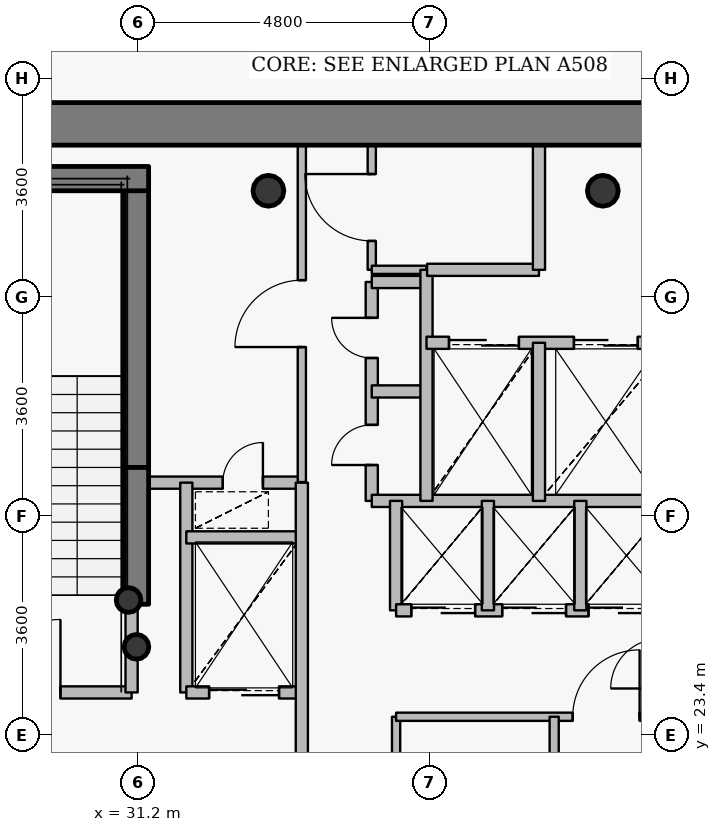
"""IFC4 building model, lengths in metres.
Left out: names, types, materials, properties, quantities, classifications, styles, units other than length and angle.
Written with IfcOpenShell. Run it as: python <this file> out.ifc"""

import sys

from ifc_helpers import new_model, si_unit, direction, frame, frame_2d, origin, origin_2d, place, context, subcontext, project, spatial, rectangle, hollow_circle, extrude, source, transform, mapped, element, fill, save


model = new_model("IFC4")
c1 = context("Model", 3, precision=1e-05, world=origin(), true_north=direction((0.0, 1.0)))
c2 = subcontext(c1, "Body", "Model", "MODEL_VIEW")
j1 = project(units=[si_unit("LENGTHUNIT", "METRE"), si_unit("PLANEANGLEUNIT", "RADIAN")], contexts=[c1])
p1 = place(None, origin())
s1 = spatial("IfcSite", under=j1, at=p1, CompositionType="ELEMENT")
p2 = place(p1, origin())
s2 = spatial("IfcBuilding", under=s1, at=p2, CompositionType="ELEMENT")
p3 = place(p2, frame((0.0, 0.0, 310.5)))
s3 = spatial("IfcBuildingStorey", under=s2, at=p3, CompositionType="ELEMENT", Elevation=310.5)
for number, where, z_axis, x_axis in (
    (1, (38.85, 32.35, 0.0), (0.0, 0.0, 1.0), (1.0, 0.0, 0.0)),
    (2, (33.35, 32.35, 0.0), (0.0, 0.0, 1.0), (1.0, 0.0, 0.0)),
):
    element("IfcColumn", number, at=place(p3, frame(where, z_axis=z_axis, x_axis=x_axis)), inside=s3, PredefinedType="COLUMN", context=c2, shape_type="SweptSolid", body=[
        extrude(hollow_circle(Radius=0.254, WallThickness=0.02, at=origin_2d()), origin(), (0.0, 0.0, 1.0), 3.75),
    ])
p4 = place(p3, frame((31.18, 27.8, 0.0), z_axis=(0.0, 0.0, 1.0), x_axis=(0.0, 1.0, 0.0)))
e3 = element("IfcWall", 3, at=p4, inside=s3, PredefinedType="SHEAR", context=c2, shape_type="SweptSolid", body=[
    extrude(rectangle(XDim=4.75, YDim=0.4, at=frame_2d((2.375, 0.0))), origin(), (0.0, 0.0, 1.0), 3.75),
])
p5 = place(p3, frame((27.25, 32.55, 0.0), z_axis=(0.0, 0.0, 1.0), x_axis=(1.0, 0.0, 0.0)))
e4 = element("IfcWall", 4, at=p5, inside=s3, PredefinedType="SHEAR", context=c2, shape_type="SweptSolid", body=[
    extrude(rectangle(XDim=4.13, YDim=0.4, at=frame_2d((2.065, 0.0))), origin(), (0.0, 0.0, 1.0), 3.75),
])
for number, where, z_axis, x_axis in (
    (5, (31.05, 25.62, 0.0), (0.0, 0.0, 1.0), (1.0, 0.0, 0.0)),
    (6, (31.18, 24.85, 0.0), (0.0, 0.0, 1.0), (1.0, 0.0, 0.0)),
):
    element("IfcColumn", number, at=place(p3, frame(where, z_axis=z_axis, x_axis=x_axis)), inside=s3, PredefinedType="COLUMN", context=c2, shape_type="SweptSolid", body=[
        extrude(hollow_circle(Radius=0.203, WallThickness=0.016, at=origin_2d()), origin(), (0.0, 0.0, 1.0), 3.75),
    ])
p6 = place(p3, frame((27.65, 33.45, 0.0), z_axis=(0.0, 0.0, 1.0), x_axis=(1.0, 0.0, 0.0)))
e7 = element("IfcWall", 7, at=p6, inside=s3, PredefinedType="SHEAR", context=c2, shape_type="SweptSolid", body=[
    extrude(rectangle(XDim=16.7, YDim=0.7, at=frame_2d((8.35, 0.0))), origin(), (0.0, 0.0, 1.0), 3.05),
])
p7 = place(p6, frame((12.775, 0.0, 0.0)))
e8 = element("IfcOpeningElement", 8, at=p7, cuts=e7, PredefinedType="OPENING", context=c2, shape_type="SweptSolid", body=[
    extrude(rectangle(XDim=1.15, YDim=2.15, at=origin_2d()), frame((0.575, 0.36, 1.075), z_axis=(0.0, -1.0, 0.0), x_axis=(1.0, 0.0, 0.0)), (0.0, 0.0, 1.0), 0.72),
])
p8 = place(p3, frame((31.18, 25.55, 0.0), z_axis=(0.0, 0.0, 1.0), x_axis=(0.0, 1.0, 0.0)))
e9 = element("IfcWall", 9, at=p8, inside=s3, PredefinedType="SHEAR", context=c2, shape_type="SweptSolid", body=[
    extrude(rectangle(XDim=2.25, YDim=0.4, at=frame_2d((1.125, 0.0))), origin(), (0.0, 0.0, 1.0), 3.1),
])
p9 = place(p3, frame((27.56, 24.1, 0.0), z_axis=(0.0, 0.0, 1.0), x_axis=(1.0, 0.0, 0.0)))
e10 = element("IfcWall", 10, at=p9, inside=s3, PredefinedType="PARTITIONING", context=c2, shape_type="SweptSolid", body=[
    extrude(rectangle(XDim=3.54, YDim=0.2, at=frame_2d((1.77, 0.0))), origin(), (0.0, 0.0, 1.0), 3.5),
])
p10 = place(p9, frame((1.17, 0.0, 0.0)))
e11 = element("IfcOpeningElement", 11, at=p10, cuts=e10, PredefinedType="OPENING", context=c2, shape_type="SweptSolid", body=[
    extrude(rectangle(XDim=1.2, YDim=2.15, at=origin_2d()), frame((0.6, 0.11, 1.075), z_axis=(0.0, -1.0, 0.0), x_axis=(1.0, 0.0, 0.0)), (0.0, 0.0, 1.0), 0.22),
])
p11 = place(p3, frame((31.1, 24.1, 0.0), z_axis=(0.0, 0.0, 1.0), x_axis=(0.0, 1.0, 0.0)))
e12 = element("IfcWall", 12, at=p11, inside=s3, PredefinedType="PARTITIONING", context=c2, shape_type="SweptSolid", body=[
    extrude(rectangle(XDim=1.44, YDim=0.2, at=frame_2d((0.72, 0.0))), origin(), (0.0, 0.0, 1.0), 3.5),
])
p12 = place(p3, frame((31.1, 27.55, 0.0), z_axis=(0.0, 0.0, 1.0), x_axis=(1.0, 0.0, 0.0)))
e13 = element("IfcWall", 13, at=p12, inside=s3, PredefinedType="PARTITIONING", context=c2, shape_type="SweptSolid", body=[
    extrude(rectangle(XDim=2.8, YDim=0.2, at=frame_2d((1.4, 0.0))), origin(), (0.0, 0.0, 1.0), 3.085),
])
p13 = place(p12, frame((1.5, 0.0, 0.0)))
e14 = element("IfcOpeningElement", 14, at=p13, cuts=e13, PredefinedType="OPENING", context=c2, shape_type="SweptSolid", body=[
    extrude(rectangle(XDim=0.66, YDim=2.05, at=origin_2d()), frame((0.33, 0.11, 1.025), z_axis=(0.0, -1.0, 0.0), x_axis=(1.0, 0.0, 0.0)), (0.0, 0.0, 1.0), 0.22),
])
p14 = place(p3, frame((32.0, 24.1, 0.0), z_axis=(0.0, 0.0, 1.0), x_axis=(0.0, 1.0, 0.0)))
e15 = element("IfcWall", 15, at=p14, inside=s3, PredefinedType="PARTITIONING", context=c2, shape_type="SweptSolid", body=[
    extrude(rectangle(XDim=3.45, YDim=0.2, at=frame_2d((1.725, 0.0))), origin(), (0.0, 0.0, 1.0), 3.5),
])
p15 = place(p3, frame((32.0, 24.1, 0.0), z_axis=(0.0, 0.0, 1.0), x_axis=(1.0, 0.0, 0.0)))
e16 = element("IfcWall", 16, at=p15, inside=s3, PredefinedType="PARTITIONING", context=c2, shape_type="SweptSolid", body=[
    extrude(rectangle(XDim=1.9, YDim=0.2, at=frame_2d((0.95, 0.0))), origin(), (0.0, 0.0, 1.0), 3.085),
])
p16 = place(p15, frame((0.375, 0.0, 0.0)))
e17 = element("IfcOpeningElement", 17, at=p16, cuts=e16, PredefinedType="OPENING", context=c2, shape_type="SweptSolid", body=[
    extrude(rectangle(XDim=1.15, YDim=2.15, at=origin_2d()), frame((0.575, 0.11, 1.075), z_axis=(0.0, -1.0, 0.0), x_axis=(1.0, 0.0, 0.0)), (0.0, 0.0, 1.0), 0.22),
])
p17 = place(p3, frame((32.0, 26.65, 0.0), z_axis=(0.0, 0.0, 1.0), x_axis=(1.0, 0.0, 0.0)))
e18 = element("IfcWall", 18, at=p17, inside=s3, PredefinedType="PARTITIONING", context=c2, shape_type="SweptSolid", body=[
    extrude(rectangle(XDim=1.9, YDim=0.2, at=frame_2d((0.95, 0.0))), origin(), (0.0, 0.0, 1.0), 3.085),
])
p18 = place(p3, frame((33.9, 20.9, 0.0), z_axis=(0.0, 0.0, 1.0), x_axis=(0.0, 1.0, 0.0)))
e19 = element("IfcWall", 19, at=p18, inside=s3, PredefinedType="PARTITIONING", context=c2, shape_type="SweptSolid", body=[
    extrude(rectangle(XDim=6.65, YDim=0.2, at=frame_2d((3.325, 0.0))), origin(), (0.0, 0.0, 1.0), 3.085),
])
p19 = place(p3, frame((33.9, 27.56, 0.0), z_axis=(0.0, 0.0, 1.0), x_axis=(0.0, 1.0, 0.0)))
e20 = element("IfcWall", 20, at=p19, inside=s3, PredefinedType="PARTITIONING", context=c2, shape_type="SweptSolid", body=[
    extrude(rectangle(XDim=5.54, YDim=0.135, at=frame_2d((2.77, 0.0))), origin(), (0.0, 0.0, 1.0), 3.085),
])
p20 = place(p19, frame((2.22, 0.0, 0.0)))
e21 = element("IfcOpeningElement", 21, at=p20, cuts=e20, PredefinedType="OPENING", context=c2, shape_type="SweptSolid", body=[
    extrude(rectangle(XDim=1.1, YDim=2.15, at=origin_2d()), frame((0.55, 0.078, 1.075), z_axis=(0.0, -1.0, 0.0), x_axis=(1.0, 0.0, 0.0)), (0.0, 0.0, 1.0), 0.155),
])
p21 = place(p3, frame((35.05, 27.25, 0.0), z_axis=(0.0, 0.0, 1.0), x_axis=(0.0, 1.0, 0.0)))
e22 = element("IfcWall", 22, at=p21, inside=s3, PredefinedType="PARTITIONING", context=c2, shape_type="SweptSolid", body=[
    extrude(rectangle(XDim=3.6, YDim=0.2, at=frame_2d((1.8, 0.0))), origin(), (0.0, 0.0, 1.0), 3.5),
])
p22 = place(p21, frame((0.59, 0.0, 0.0)))
e23 = element("IfcOpeningElement", 23, at=p22, cuts=e22, PredefinedType="OPENING", context=c2, shape_type="SweptSolid", body=[
    extrude(rectangle(XDim=0.66, YDim=2.05, at=origin_2d()), frame((0.33, 0.11, 1.025), z_axis=(0.0, -1.0, 0.0), x_axis=(1.0, 0.0, 0.0)), (0.0, 0.0, 1.0), 0.22),
])
p23 = place(p21, frame((2.35, 0.0, 0.0)))
e24 = element("IfcOpeningElement", 24, at=p23, cuts=e22, PredefinedType="OPENING", context=c2, shape_type="SweptSolid", body=[
    extrude(rectangle(XDim=0.66, YDim=2.05, at=origin_2d()), frame((0.33, 0.11, 1.025), z_axis=(0.0, -1.0, 0.0), x_axis=(1.0, 0.0, 0.0)), (0.0, 0.0, 1.0), 0.22),
])
p24 = place(p3, frame((35.05, 27.25, 0.0), z_axis=(0.0, 0.0, 1.0), x_axis=(1.0, 0.0, 0.0)))
e25 = element("IfcWall", 25, at=p24, inside=s3, PredefinedType="PARTITIONING", context=c2, shape_type="SweptSolid", body=[
    extrude(rectangle(XDim=4.95, YDim=0.2, at=frame_2d((2.475, 0.0))), origin(), (0.0, 0.0, 1.0), 3.085),
])
for number, where, z_axis, x_axis in (
    (26, (35.05, 29.05, 0.0), (0.0, 0.0, 1.0), (1.0, 0.0, 0.0)),
    (27, (35.05, 30.85, 0.0), (0.0, 0.0, 1.0), (1.0, 0.0, 0.0)),
):
    element("IfcWall", number, at=place(p3, frame(where, z_axis=z_axis, x_axis=x_axis)), inside=s3, PredefinedType="PARTITIONING", context=c2, shape_type="SweptSolid", body=[
        extrude(rectangle(XDim=0.9, YDim=0.2, at=frame_2d((0.45, 0.0))), origin(), (0.0, 0.0, 1.0), 3.5),
    ])
p25 = place(p3, frame((35.05, 31.05, 0.0), z_axis=(0.0, 0.0, 1.0), x_axis=(0.0, 1.0, 0.0)))
e28 = element("IfcWall", 28, at=p25, inside=s3, PredefinedType="PARTITIONING", context=c2, shape_type="SweptSolid", body=[
    extrude(rectangle(XDim=2.05, YDim=0.135, at=frame_2d((1.025, 0.0))), origin(), (0.0, 0.0, 1.0), 3.085),
])
p26 = place(p25, frame((0.475, 0.0, 0.0)))
e29 = element("IfcOpeningElement", 29, at=p26, cuts=e28, PredefinedType="OPENING", context=c2, shape_type="SweptSolid", body=[
    extrude(rectangle(XDim=1.1, YDim=2.15, at=origin_2d()), frame((0.55, 0.078, 1.075), z_axis=(0.0, -1.0, 0.0), x_axis=(1.0, 0.0, 0.0)), (0.0, 0.0, 1.0), 0.155),
])
p27 = place(p3, frame((35.05, 31.05, 0.0), z_axis=(0.0, 0.0, 1.0), x_axis=(1.0, 0.0, 0.0)))
e30 = element("IfcWall", 30, at=p27, inside=s3, PredefinedType="PARTITIONING", context=c2, shape_type="SweptSolid", body=[
    extrude(rectangle(XDim=0.9, YDim=0.135, at=frame_2d((0.45, 0.0))), origin(), (0.0, 0.0, 1.0), 3.5),
])
p28 = place(p3, frame((35.45, 20.9, 0.0), z_axis=(0.0, 0.0, 1.0), x_axis=(0.0, 1.0, 0.0)))
e31 = element("IfcWall", 31, at=p28, inside=s3, PredefinedType="PARTITIONING", context=c2, shape_type="SweptSolid", body=[
    extrude(rectangle(XDim=2.8, YDim=0.135, at=frame_2d((1.4, 0.0))), origin(), (0.0, 0.0, 1.0), 3.085),
])
p29 = place(p28, frame((0.85, 0.0, 0.0)))
e32 = element("IfcOpeningElement", 32, at=p29, cuts=e31, PredefinedType="OPENING", context=c2, shape_type="SweptSolid", body=[
    extrude(rectangle(XDim=1.1, YDim=2.15, at=origin_2d()), frame((0.55, 0.078, 1.075), z_axis=(0.0, -1.0, 0.0), x_axis=(1.0, 0.0, 0.0)), (0.0, 0.0, 1.0), 0.155),
])
p30 = place(p3, frame((35.45, 23.7, 0.0), z_axis=(0.0, 0.0, 1.0), x_axis=(1.0, 0.0, 0.0)))
e33 = element("IfcWall", 33, at=p30, inside=s3, PredefinedType="PARTITIONING", context=c2, shape_type="SweptSolid", body=[
    extrude(rectangle(XDim=4.35, YDim=0.135, at=frame_2d((2.175, 0.0))), origin(), (0.0, 0.0, 1.0), 3.085),
])
p31 = place(p30, frame((2.905, 0.0, 0.0)))
e34 = element("IfcOpeningElement", 34, at=p31, cuts=e33, PredefinedType="OPENING", context=c2, shape_type="SweptSolid", body=[
    extrude(rectangle(XDim=1.1, YDim=2.15, at=origin_2d()), frame((0.55, 0.078, 1.075), z_axis=(0.0, -1.0, 0.0), x_axis=(1.0, 0.0, 0.0)), (0.0, 0.0, 1.0), 0.155),
])
p32 = place(p3, frame((35.45, 25.45, 0.0), z_axis=(0.0, 0.0, 1.0), x_axis=(0.0, 1.0, 0.0)))
e35 = element("IfcWall", 35, at=p32, inside=s3, PredefinedType="PARTITIONING", context=c2, shape_type="SweptSolid", body=[
    extrude(rectangle(XDim=1.8, YDim=0.2, at=frame_2d((0.9, 0.0))), origin(), (0.0, 0.0, 1.0), 3.5),
])
p33 = place(p3, frame((35.45, 25.45, 0.0), z_axis=(0.0, 0.0, 1.0), x_axis=(1.0, 0.0, 0.0)))
e36 = element("IfcWall", 36, at=p33, inside=s3, PredefinedType="PARTITIONING", context=c2, shape_type="SweptSolid", body=[
    extrude(rectangle(XDim=4.55, YDim=0.2, at=frame_2d((2.275, 0.0))), origin(), (0.0, 0.0, 1.0), 3.085),
])
p34 = place(p33, frame((0.25, 0.0, 0.0)))
e37 = element("IfcOpeningElement", 37, at=p34, cuts=e36, PredefinedType="OPENING", context=c2, shape_type="SweptSolid", body=[
    extrude(rectangle(XDim=1.05, YDim=2.15, at=origin_2d()), frame((0.525, 0.11, 1.075), z_axis=(0.0, -1.0, 0.0), x_axis=(1.0, 0.0, 0.0)), (0.0, 0.0, 1.0), 0.22),
])
p35 = place(p33, frame((1.745, 0.0, 0.0)))
e38 = element("IfcOpeningElement", 38, at=p35, cuts=e36, PredefinedType="OPENING", context=c2, shape_type="SweptSolid", body=[
    extrude(rectangle(XDim=1.05, YDim=2.15, at=origin_2d()), frame((0.525, 0.11, 1.075), z_axis=(0.0, -1.0, 0.0), x_axis=(1.0, 0.0, 0.0)), (0.0, 0.0, 1.0), 0.22),
])
p36 = place(p33, frame((3.165, 0.0, 0.0)))
e39 = element("IfcOpeningElement", 39, at=p36, cuts=e36, PredefinedType="OPENING", context=c2, shape_type="SweptSolid", body=[
    extrude(rectangle(XDim=1.05, YDim=2.15, at=origin_2d()), frame((0.525, 0.11, 1.075), z_axis=(0.0, -1.0, 0.0), x_axis=(1.0, 0.0, 0.0)), (0.0, 0.0, 1.0), 0.22),
])
p37 = place(p3, frame((35.95, 27.25, 0.0), z_axis=(0.0, 0.0, 1.0), x_axis=(0.0, 1.0, 0.0)))
e40 = element("IfcWall", 40, at=p37, inside=s3, PredefinedType="PARTITIONING", context=c2, shape_type="SweptSolid", body=[
    extrude(rectangle(XDim=3.8, YDim=0.2, at=frame_2d((1.9, 0.0))), origin(), (0.0, 0.0, 1.0), 3.5),
])
p38 = place(p3, frame((35.95, 29.85, 0.0), z_axis=(0.0, 0.0, 1.0), x_axis=(1.0, 0.0, 0.0)))
e41 = element("IfcWall", 41, at=p38, inside=s3, PredefinedType="PARTITIONING", context=c2, shape_type="SweptSolid", body=[
    extrude(rectangle(XDim=8.49, YDim=0.2, at=frame_2d((4.245, 0.0))), origin(), (0.0, 0.0, 1.0), 3.085),
])
p39 = place(p38, frame((6.1, 0.0, 0.0)))
e42 = element("IfcOpeningElement", 42, at=p39, cuts=e41, PredefinedType="OPENING", context=c2, shape_type="SweptSolid", body=[
    extrude(rectangle(XDim=1.2, YDim=2.15, at=origin_2d()), frame((0.6, 0.11, 1.075), z_axis=(0.0, -1.0, 0.0), x_axis=(1.0, 0.0, 0.0)), (0.0, 0.0, 1.0), 0.22),
])
p40 = place(p38, frame((0.37, 0.0, 0.0)))
e43 = element("IfcOpeningElement", 43, at=p40, cuts=e41, PredefinedType="OPENING", context=c2, shape_type="SweptSolid", body=[
    extrude(rectangle(XDim=1.15, YDim=2.15, at=origin_2d()), frame((0.575, 0.11, 1.075), z_axis=(0.0, -1.0, 0.0), x_axis=(1.0, 0.0, 0.0)), (0.0, 0.0, 1.0), 0.22),
])
p41 = place(p38, frame((2.425, 0.0, 0.0)))
e44 = element("IfcOpeningElement", 44, at=p41, cuts=e41, PredefinedType="OPENING", context=c2, shape_type="SweptSolid", body=[
    extrude(rectangle(XDim=1.05, YDim=2.15, at=origin_2d()), frame((0.525, 0.11, 1.075), z_axis=(0.0, -1.0, 0.0), x_axis=(1.0, 0.0, 0.0)), (0.0, 0.0, 1.0), 0.22),
])
p42 = place(p3, frame((35.96, 31.05, 0.0), z_axis=(0.0, 0.0, 1.0), x_axis=(1.0, 0.0, 0.0)))
e45 = element("IfcWall", 45, at=p42, inside=s3, PredefinedType="PARTITIONING", context=c2, shape_type="SweptSolid", body=[
    extrude(rectangle(XDim=1.84, YDim=0.2, at=frame_2d((0.92, 0.0))), origin(), (0.0, 0.0, 1.0), 3.5),
])
p43 = place(p3, frame((36.96, 25.45, 0.0), z_axis=(0.0, 0.0, 1.0), x_axis=(0.0, 1.0, 0.0)))
e46 = element("IfcWall", 46, at=p43, inside=s3, PredefinedType="PARTITIONING", context=c2, shape_type="SweptSolid", body=[
    extrude(rectangle(XDim=1.8, YDim=0.2, at=frame_2d((0.9, 0.0))), origin(), (0.0, 0.0, 1.0), 3.5),
])
p44 = place(p3, frame((37.8, 27.25, 0.0), z_axis=(0.0, 0.0, 1.0), x_axis=(0.0, 1.0, 0.0)))
e47 = element("IfcWall", 47, at=p44, inside=s3, PredefinedType="PARTITIONING", context=c2, shape_type="SweptSolid", body=[
    extrude(rectangle(XDim=2.6, YDim=0.2, at=frame_2d((1.3, 0.0))), origin(), (0.0, 0.0, 1.0), 3.5),
])
p45 = place(p3, frame((37.8, 31.05, 0.0), z_axis=(0.0, 0.0, 1.0), x_axis=(0.0, 1.0, 0.0)))
e48 = element("IfcWall", 48, at=p45, inside=s3, PredefinedType="PARTITIONING", context=c2, shape_type="SweptSolid", body=[
    extrude(rectangle(XDim=2.05, YDim=0.2, at=frame_2d((1.025, 0.0))), origin(), (0.0, 0.0, 1.0), 3.085),
])
p46 = place(p3, frame((38.05, 20.38, 0.0), z_axis=(0.0, 0.0, 1.0), x_axis=(0.0, 1.0, 0.0)))
e49 = element("IfcWall", 49, at=p46, inside=s3, PredefinedType="PARTITIONING", context=c2, shape_type="SweptSolid", body=[
    extrude(rectangle(XDim=3.32, YDim=0.15, at=frame_2d((1.66, 0.0))), origin(), (0.0, 0.0, 1.0), 3.035),
])
p47 = place(p3, frame((38.48, 25.45, 0.0), z_axis=(0.0, 0.0, 1.0), x_axis=(0.0, 1.0, 0.0)))
e50 = element("IfcWall", 50, at=p47, inside=s3, PredefinedType="PARTITIONING", context=c2, shape_type="SweptSolid", body=[
    extrude(rectangle(XDim=1.8, YDim=0.2, at=frame_2d((0.9, 0.0))), origin(), (0.0, 0.0, 1.0), 3.5),
])
m1 = source(origin(), c2, "Body", "SweptSolid", [
    extrude(rectangle(XDim=1.2, YDim=2.15, at=origin_2d()), frame((0.6, 0.025, 1.075), z_axis=(0.0, -1.0, 0.0), x_axis=(1.0, 0.0, 0.0)), (0.0, 0.0, 1.0), 0.05),
])
p48 = place(p10, origin())
e51 = element("IfcDoor", 51, at=p48, inside=s3, OperationType="SINGLE_SWING_RIGHT", PredefinedType="DOOR", context=c2, shape_type="MappedRepresentation", body=[
    mapped(m1, transform((0.0, 0.0, 0.0), x_axis=(1.0, 0.0, 0.0), y_axis=(0.0, 1.0, 0.0), z_axis=(0.0, 0.0, 1.0), scale=1.0)),
])
fill(e11, e51)
m2 = source(origin(), c2, "Body", "SweptSolid", [
    extrude(rectangle(XDim=1.15, YDim=2.15, at=origin_2d()), frame((0.575, 0.025, 1.075), z_axis=(0.0, -1.0, 0.0), x_axis=(1.0, 0.0, 0.0)), (0.0, 0.0, 1.0), 0.05),
])
p49 = place(p40, origin())
e52 = element("IfcDoor", 52, at=p49, inside=s3, OperationType="DOUBLE_DOOR_SLIDING", PredefinedType="USERDEFINED", context=c2, shape_type="MappedRepresentation", body=[
    mapped(m2, transform((0.0, 0.0, 0.0), x_axis=(1.0, 0.0, 0.0), y_axis=(0.0, 1.0, 0.0), z_axis=(0.0, 0.0, 1.0), scale=1.0)),
])
fill(e43, e52)
p50 = place(p16, origin())
e53 = element("IfcDoor", 53, at=p50, inside=s3, OperationType="DOUBLE_DOOR_SLIDING", PredefinedType="USERDEFINED", context=c2, shape_type="MappedRepresentation", body=[
    mapped(m2, transform((0.0, 0.0, 0.0), x_axis=(1.0, 0.0, 0.0), y_axis=(0.0, 1.0, 0.0), z_axis=(0.0, 0.0, 1.0), scale=1.0)),
])
fill(e17, e53)
m3 = source(origin(), c2, "Body", "SweptSolid", [
    extrude(rectangle(XDim=1.05, YDim=2.15, at=origin_2d()), frame((0.525, 0.025, 1.075), z_axis=(0.0, -1.0, 0.0), x_axis=(1.0, 0.0, 0.0)), (0.0, 0.0, 1.0), 0.05),
])
p51 = place(p41, origin())
e54 = element("IfcDoor", 54, at=p51, inside=s3, OperationType="DOUBLE_DOOR_SLIDING", PredefinedType="USERDEFINED", context=c2, shape_type="MappedRepresentation", body=[
    mapped(m3, transform((0.0, 0.0, 0.0), x_axis=(1.0, 0.0, 0.0), y_axis=(0.0, 1.0, 0.0), z_axis=(0.0, 0.0, 1.0), scale=1.0)),
])
fill(e44, e54)
p52 = place(p34, origin())
e55 = element("IfcDoor", 55, at=p52, inside=s3, OperationType="DOUBLE_DOOR_SLIDING", PredefinedType="USERDEFINED", context=c2, shape_type="MappedRepresentation", body=[
    mapped(m3, transform((0.0, 0.0, 0.0), x_axis=(1.0, 0.0, 0.0), y_axis=(0.0, 1.0, 0.0), z_axis=(0.0, 0.0, 1.0), scale=1.0)),
])
fill(e37, e55)
p53 = place(p35, origin())
e56 = element("IfcDoor", 56, at=p53, inside=s3, OperationType="DOUBLE_DOOR_SLIDING", PredefinedType="USERDEFINED", context=c2, shape_type="MappedRepresentation", body=[
    mapped(m3, transform((0.0, 0.0, 0.0), x_axis=(1.0, 0.0, 0.0), y_axis=(0.0, 1.0, 0.0), z_axis=(0.0, 0.0, 1.0), scale=1.0)),
])
fill(e38, e56)
p54 = place(p36, origin())
e57 = element("IfcDoor", 57, at=p54, inside=s3, OperationType="DOUBLE_DOOR_SLIDING", PredefinedType="USERDEFINED", context=c2, shape_type="MappedRepresentation", body=[
    mapped(m3, transform((0.0, 0.0, 0.0), x_axis=(1.0, 0.0, 0.0), y_axis=(0.0, 1.0, 0.0), z_axis=(0.0, 0.0, 1.0), scale=1.0)),
])
fill(e39, e57)
m4 = source(origin(), c2, "Body", "SweptSolid", [
    extrude(rectangle(XDim=0.66, YDim=2.05, at=origin_2d()), frame((0.33, 0.025, 1.025), z_axis=(0.0, -1.0, 0.0), x_axis=(1.0, 0.0, 0.0)), (0.0, 0.0, 1.0), 0.05),
])
p55 = place(p22, origin())
e58 = element("IfcDoor", 58, at=p55, inside=s3, OperationType="SINGLE_SWING_LEFT", PredefinedType="USERDEFINED", context=c2, shape_type="MappedRepresentation", body=[
    mapped(m4, transform((0.0, 0.0, 0.0), x_axis=(1.0, 0.0, 0.0), y_axis=(0.0, 1.0, 0.0), z_axis=(0.0, 0.0, 1.0), scale=1.0)),
])
fill(e23, e58)
p56 = place(p23, origin())
e59 = element("IfcDoor", 59, at=p56, inside=s3, OperationType="SINGLE_SWING_RIGHT", PredefinedType="USERDEFINED", context=c2, shape_type="MappedRepresentation", body=[
    mapped(m4, transform((0.0, 0.0, 0.0), x_axis=(1.0, 0.0, 0.0), y_axis=(0.0, 1.0, 0.0), z_axis=(0.0, 0.0, 1.0), scale=1.0)),
])
fill(e24, e59)
m5 = source(origin(), c2, "Body", "SweptSolid", [
    extrude(rectangle(XDim=1.1, YDim=2.15, at=origin_2d()), frame((0.55, 0.025, 1.075), z_axis=(0.0, -1.0, 0.0), x_axis=(1.0, 0.0, 0.0)), (0.0, 0.0, 1.0), 0.05),
])
p57 = place(p31, origin())
e60 = element("IfcDoor", 60, at=p57, inside=s3, OperationType="SINGLE_SWING_RIGHT", PredefinedType="DOOR", context=c2, shape_type="MappedRepresentation", body=[
    mapped(m5, transform((0.0, 0.0, 0.0), x_axis=(1.0, 0.0, 0.0), y_axis=(0.0, 1.0, 0.0), z_axis=(0.0, 0.0, 1.0), scale=1.0)),
])
fill(e34, e60)
p58 = place(p20, origin())
e61 = element("IfcDoor", 61, at=p58, inside=s3, OperationType="SINGLE_SWING_LEFT", PredefinedType="DOOR", context=c2, shape_type="MappedRepresentation", body=[
    mapped(m5, transform((0.0, 0.0, 0.0), x_axis=(1.0, 0.0, 0.0), y_axis=(0.0, 1.0, 0.0), z_axis=(0.0, 0.0, 1.0), scale=1.0)),
])
fill(e21, e61)
p59 = place(p26, origin())
e62 = element("IfcDoor", 62, at=p59, inside=s3, OperationType="SINGLE_SWING_RIGHT", PredefinedType="DOOR", context=c2, shape_type="MappedRepresentation", body=[
    mapped(m5, transform((0.0, 0.0, 0.0), x_axis=(1.0, 0.0, 0.0), y_axis=(0.0, 1.0, 0.0), z_axis=(0.0, 0.0, 1.0), scale=1.0)),
])
fill(e29, e62)
p60 = place(p13, origin())
e63 = element("IfcDoor", 63, at=p60, inside=s3, OperationType="SINGLE_SWING_RIGHT", PredefinedType="USERDEFINED", context=c2, shape_type="MappedRepresentation", body=[
    mapped(m4, transform((0.0, 0.0, 0.0), x_axis=(1.0, 0.0, 0.0), y_axis=(0.0, 1.0, 0.0), z_axis=(0.0, 0.0, 1.0), scale=1.0)),
])
fill(e14, e63)
save(model, sys.argv[1])
